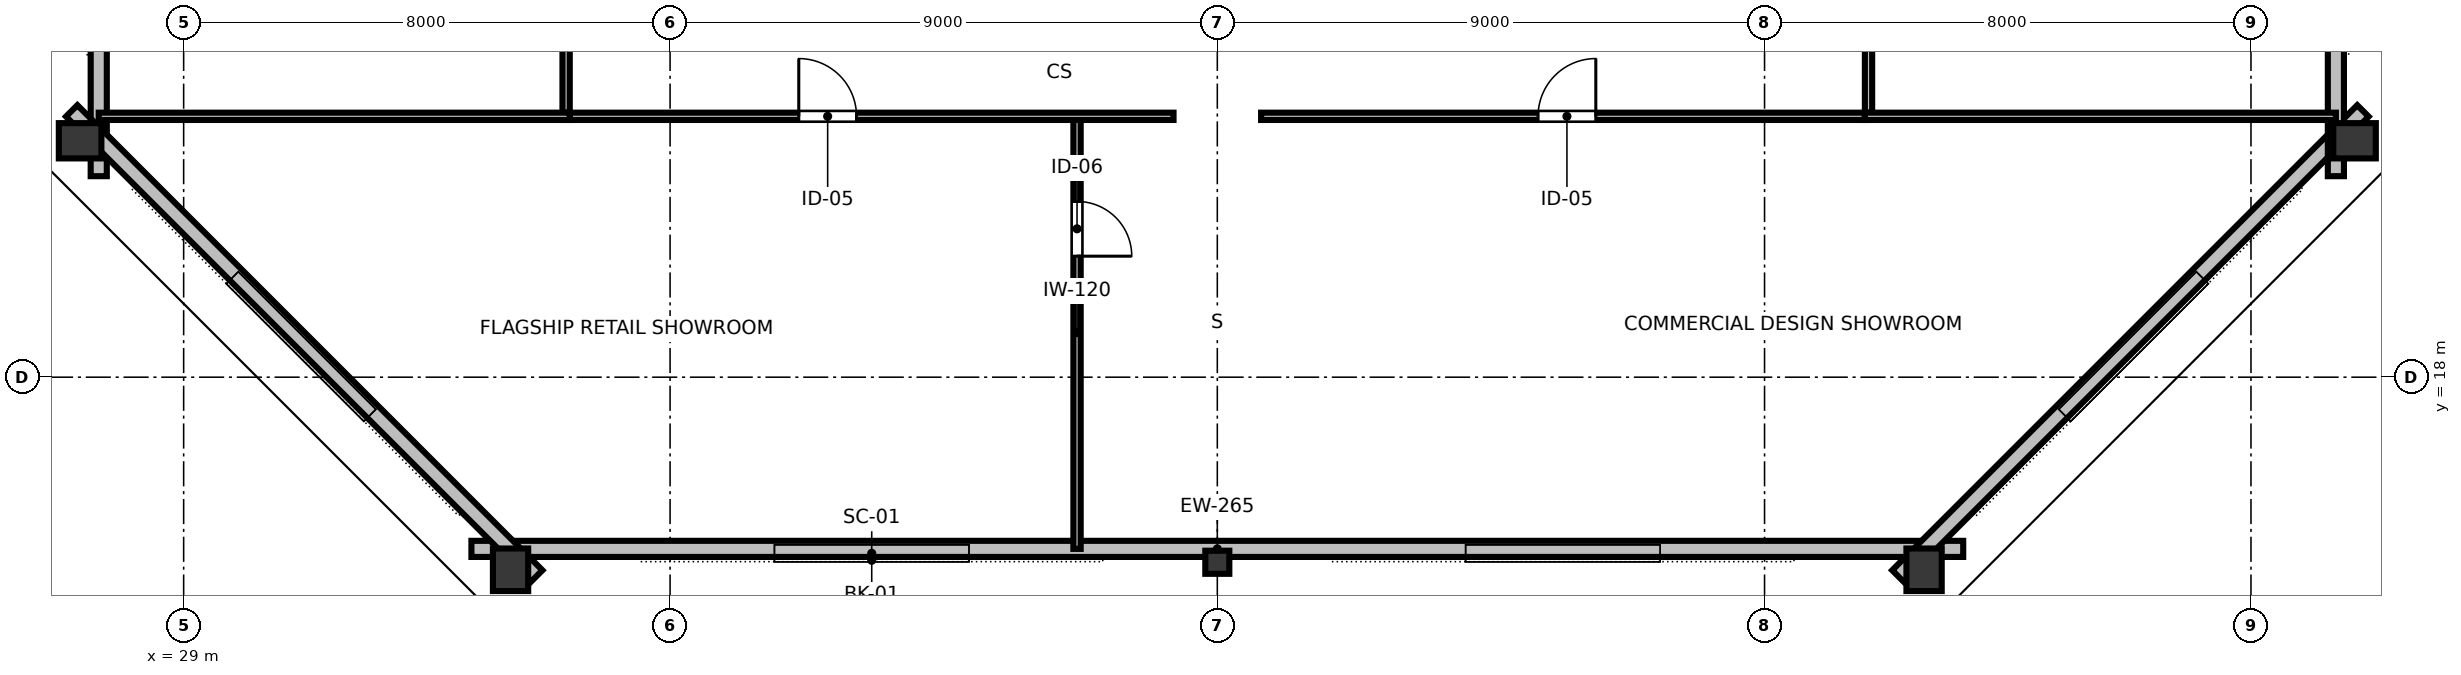
"""IFC4 building model, lengths in metres.
Left out: names, types, materials, properties, quantities, classifications, styles, units other than length and angle.
Written with IfcOpenShell. Run it as: python <this file> out.ifc"""

import sys

from ifc_helpers import new_model, si_unit, direction, frame, frame_2d, origin, origin_2d, place, context, subcontext, project, spatial, rectangle, hollow_rectangle, i_section, extrude, element, fill, save


model = new_model("IFC4")
c1 = context("Model", 3, precision=1e-05, world=origin(), true_north=direction((0.0, 1.0)))
c2 = subcontext(c1, "Body", "Model", "MODEL_VIEW")
j1 = project(units=[si_unit("LENGTHUNIT", "METRE"), si_unit("PLANEANGLEUNIT", "RADIAN")], contexts=[c1])
p1 = place(None, origin())
s1 = spatial("IfcSite", under=j1, at=p1, CompositionType="ELEMENT")
p2 = place(p1, origin())
s2 = spatial("IfcBuilding", under=s1, at=p2, CompositionType="ELEMENT")
p3 = place(p2, frame((0.0, 0.0, 250.2)))
s3 = spatial("IfcBuildingStorey", under=s2, at=p3, CompositionType="ELEMENT", Elevation=250.2)
p4 = place(p3, frame((34.376, 14.833, 0.0), z_axis=(0.0, 0.0, 1.0), x_axis=(1.0, 0.0, 0.0)))
e1 = element("IfcColumn", 1, at=p4, inside=s3, PredefinedType="COLUMN", context=c2, shape_type="SweptSolid", body=[
    extrude(hollow_rectangle(XDim=0.58, YDim=0.7, WallThickness=0.032, at=origin_2d()), origin(), (0.0, 0.0, 1.0), 3.373),
])
p5 = place(p3, frame((46.0, 14.956, 0.0), z_axis=(0.0, 0.0, 1.0), x_axis=(1.0, 0.0, 0.0)))
e2 = element("IfcColumn", 2, at=p5, inside=s3, PredefinedType="COLUMN", context=c2, shape_type="SweptSolid", body=[
    extrude(i_section(OverallWidth=0.395, OverallDepth=0.38, WebThickness=0.019, FlangeThickness=0.03, FilletRadius=0.025, at=origin_2d()), origin(), (0.0, 0.0, 1.0), 3.373),
])
for number, where, z_axis, x_axis in (
    (3, (57.624, 14.833, 0.0), (0.0, 0.0, 1.0), (1.0, 0.0, 0.0)),
    (4, (64.703, 21.888, 0.0), (0.0, 0.0, 1.0), (0.0, 1.0, 0.0)),
    (5, (27.297, 21.888, 0.0), (0.0, 0.0, 1.0), (0.0, 1.0, 0.0)),
):
    element("IfcColumn", number, at=place(p3, frame(where, z_axis=z_axis, x_axis=x_axis)), inside=s3, PredefinedType="COLUMN", context=c2, shape_type="SweptSolid", body=[
        extrude(hollow_rectangle(XDim=0.58, YDim=0.7, WallThickness=0.032, at=origin_2d()), origin(), (0.0, 0.0, 1.0), 3.373),
    ])
p6 = place(p3, frame((33.733, 15.177, 0.0), z_axis=(0.0, 0.0, 1.0), x_axis=(1.0, 0.0, 0.0)))
e6 = element("IfcWall", 6, at=p6, inside=s3, PredefinedType="STANDARD", context=c2, shape_type="SweptSolid", body=[
    extrude(rectangle(XDim=24.535, YDim=0.265, at=frame_2d((12.267, 0.0))), origin(), (0.0, 0.0, 1.0), 2.832),
])
p7 = place(p3, frame((57.193, 14.731, 0.0), z_axis=(0.0, 0.0, 1.0), x_axis=(0.707106781187, 0.707106781187, 0.0)))
e7 = element("IfcWall", 7, at=p7, inside=s3, PredefinedType="STANDARD", context=c2, shape_type="SweptSolid", body=[
    extrude(rectangle(XDim=10.816, YDim=0.265, at=frame_2d((5.408, 0.0))), origin(), (0.0, 0.0, 1.0), 2.832),
])
for number, where, z_axis, x_axis in (
    (8, (64.396, 21.305, 0.0), (0.0, 0.0, 1.0), (0.0, 1.0, 0.0)),
    (9, (27.604, 42.695, 0.0), (0.0, 0.0, 1.0), (0.0, -1.0, 0.0)),
):
    element("IfcWall", number, at=place(p3, frame(where, z_axis=z_axis, x_axis=x_axis)), inside=s3, PredefinedType="STANDARD", context=c2, shape_type="SweptSolid", body=[
        extrude(rectangle(XDim=21.389, YDim=0.265, at=frame_2d((10.695, 0.0))), origin(), (0.0, 0.0, 1.0), 2.832),
    ])
p8 = place(p3, frame((27.159, 22.38, 0.0), z_axis=(0.0, 0.0, 1.0), x_axis=(0.707106781187, -0.707106781187, 0.0)))
e10 = element("IfcWall", 10, at=p8, inside=s3, PredefinedType="STANDARD", context=c2, shape_type="SweptSolid", body=[
    extrude(rectangle(XDim=10.816, YDim=0.265, at=frame_2d((5.408, 0.0))), origin(), (0.0, 0.0, 1.0), 2.832),
])
p9 = place(p3, frame((43.693, 22.29, 0.0), z_axis=(0.0, 0.0, 1.0), x_axis=(0.0, -1.0, 0.0)))
e11 = element("IfcWall", 11, at=p9, inside=s3, PredefinedType="PARTITIONING", context=c2, shape_type="SweptSolid", body=[
    extrude(rectangle(XDim=7.114, YDim=0.12, at=frame_2d((3.557, 0.0))), origin(), (0.0, 0.0, 1.0), 2.655),
])
p10 = place(p9, frame((1.4, 0.0, 0.0)))
e12 = element("IfcOpeningElement", 12, at=p10, cuts=e11, PredefinedType="OPENING", context=c2, shape_type="SweptSolid", body=[
    extrude(rectangle(XDim=0.9, YDim=2.15, at=frame_2d((0.45, 1.075))), frame((0.0, 0.07, 0.0), z_axis=(0.0, -1.0, 0.0), x_axis=(1.0, 0.0, 0.0)), (0.0, 0.0, 1.0), 0.14),
])
p11 = place(p3, frame((35.35, 22.29, 0.0), z_axis=(0.0, 0.0, 1.0), x_axis=(1.0, 0.0, 0.0)))
e13 = element("IfcWall", 13, at=p11, inside=s3, PredefinedType="PARTITIONING", context=c2, shape_type="SweptSolid", body=[
    extrude(rectangle(XDim=9.93, YDim=0.12, at=frame_2d((4.965, 0.0))), origin(), (0.0, 0.0, 1.0), 2.655),
])
p12 = place(p11, frame((3.767, 0.0, 0.0)))
e14 = element("IfcOpeningElement", 14, at=p12, cuts=e13, PredefinedType="OPENING", context=c2, shape_type="SweptSolid", body=[
    extrude(rectangle(XDim=0.95, YDim=2.15, at=frame_2d((0.475, 1.075))), frame((0.0, 0.07, 0.0), z_axis=(0.0, -1.0, 0.0), x_axis=(1.0, 0.0, 0.0)), (0.0, 0.0, 1.0), 0.14),
])
p13 = place(p3, frame((46.72, 22.29, 0.0), z_axis=(0.0, 0.0, 1.0), x_axis=(1.0, 0.0, 0.0)))
e15 = element("IfcWall", 15, at=p13, inside=s3, PredefinedType="PARTITIONING", context=c2, shape_type="SweptSolid", body=[
    extrude(rectangle(XDim=9.93, YDim=0.12, at=frame_2d((4.965, 0.0))), origin(), (0.0, 0.0, 1.0), 2.655),
])
p14 = place(p13, frame((4.555, 0.0, 0.0)))
e16 = element("IfcOpeningElement", 16, at=p14, cuts=e15, PredefinedType="OPENING", context=c2, shape_type="SweptSolid", body=[
    extrude(rectangle(XDim=0.95, YDim=2.15, at=frame_2d((0.475, 1.075))), frame((0.0, 0.07, 0.0), z_axis=(0.0, -1.0, 0.0), x_axis=(1.0, 0.0, 0.0)), (0.0, 0.0, 1.0), 0.14),
])
p15 = place(p3, frame((35.29, 22.35, 0.0), z_axis=(0.0, 0.0, 1.0), x_axis=(0.0, 1.0, 0.0)))
e17 = element("IfcWall", 17, at=p15, inside=s3, PredefinedType="PARTITIONING", context=c2, shape_type="SweptSolid", body=[
    extrude(rectangle(XDim=19.3, YDim=0.12, at=frame_2d((9.65, 0.0))), origin(), (0.0, 0.0, 1.0), 2.655),
])
p16 = place(p15, frame((3.656, 0.0, 0.0)))
e18 = element("IfcOpeningElement", 18, at=p16, cuts=e17, PredefinedType="OPENING", context=c2, shape_type="SweptSolid", body=[
    extrude(rectangle(XDim=0.95, YDim=2.15, at=frame_2d((0.475, 1.075))), frame((0.0, 0.07, 0.0), z_axis=(0.0, -1.0, 0.0), x_axis=(1.0, 0.0, 0.0)), (0.0, 0.0, 1.0), 0.14),
])
p17 = place(p15, frame((13.106, 0.0, 0.0)))
e19 = element("IfcOpeningElement", 19, at=p17, cuts=e17, PredefinedType="OPENING", context=c2, shape_type="SweptSolid", body=[
    extrude(rectangle(XDim=0.95, YDim=2.15, at=frame_2d((0.475, 1.075))), frame((0.0, 0.07, 0.0), z_axis=(0.0, -1.0, 0.0), x_axis=(1.0, 0.0, 0.0)), (0.0, 0.0, 1.0), 0.14),
])
p18 = place(p3, frame((56.71, 22.35, 0.0), z_axis=(0.0, 0.0, 1.0), x_axis=(0.0, 1.0, 0.0)))
e20 = element("IfcWall", 20, at=p18, inside=s3, PredefinedType="PARTITIONING", context=c2, shape_type="SweptSolid", body=[
    extrude(rectangle(XDim=19.3, YDim=0.12, at=frame_2d((9.65, 0.0))), origin(), (0.0, 0.0, 1.0), 2.655),
])
p19 = place(p18, frame((5.657, 0.0, 0.0)))
e21 = element("IfcOpeningElement", 21, at=p19, cuts=e20, PredefinedType="OPENING", context=c2, shape_type="SweptSolid", body=[
    extrude(rectangle(XDim=0.95, YDim=2.15, at=frame_2d((0.475, 1.075))), frame((0.0, 0.07, 0.0), z_axis=(0.0, -1.0, 0.0), x_axis=(1.0, 0.0, 0.0)), (0.0, 0.0, 1.0), 0.14),
])
p20 = place(p18, frame((15.107, 0.0, 0.0)))
e22 = element("IfcOpeningElement", 22, at=p20, cuts=e20, PredefinedType="OPENING", context=c2, shape_type="SweptSolid", body=[
    extrude(rectangle(XDim=0.95, YDim=2.15, at=frame_2d((0.475, 1.075))), frame((0.0, 0.07, 0.0), z_axis=(0.0, -1.0, 0.0), x_axis=(1.0, 0.0, 0.0)), (0.0, 0.0, 1.0), 0.14),
])
for number, where, z_axis, x_axis in (
    (23, (35.35, 22.29, 0.0), (0.0, 0.0, 1.0), (-1.0, 0.0, 0.0)),
    (24, (56.65, 22.29, 0.0), (0.0, 0.0, 1.0), (1.0, 0.0, 0.0)),
):
    element("IfcWall", number, at=place(p3, frame(where, z_axis=z_axis, x_axis=x_axis)), inside=s3, PredefinedType="PARTITIONING", context=c2, shape_type="SweptSolid", body=[
        extrude(rectangle(XDim=7.747, YDim=0.12, at=frame_2d((3.873, 0.0))), origin(), (0.0, 0.0, 1.0), 2.655),
    ])
p21 = place(p10, origin())
e25 = element("IfcDoor", 25, at=p21, inside=s3, OperationType="SINGLE_SWING_RIGHT", PredefinedType="DOOR", context=c2, shape_type="SweptSolid", body=[
    extrude(rectangle(XDim=0.9, YDim=2.15, at=frame_2d((0.45, 1.075))), frame((0.0, 0.025, 0.0), z_axis=(0.0, -1.0, 0.0), x_axis=(1.0, 0.0, 0.0)), (0.0, 0.0, 1.0), 0.05),
])
fill(e12, e25)
p22 = place(p12, origin())
e26 = element("IfcDoor", 26, at=p22, inside=s3, OperationType="SINGLE_SWING_LEFT", PredefinedType="DOOR", context=c2, shape_type="SweptSolid", body=[
    extrude(rectangle(XDim=0.95, YDim=2.15, at=frame_2d((0.475, 1.075))), frame((0.0, 0.025, 0.0), z_axis=(0.0, -1.0, 0.0), x_axis=(1.0, 0.0, 0.0)), (0.0, 0.0, 1.0), 0.05),
])
fill(e14, e26)
p23 = place(p14, origin())
e27 = element("IfcDoor", 27, at=p23, inside=s3, OperationType="SINGLE_SWING_RIGHT", PredefinedType="DOOR", context=c2, shape_type="SweptSolid", body=[
    extrude(rectangle(XDim=0.95, YDim=2.15, at=frame_2d((0.475, 1.075))), frame((0.0, 0.025, 0.0), z_axis=(0.0, -1.0, 0.0), x_axis=(1.0, 0.0, 0.0)), (0.0, 0.0, 1.0), 0.05),
])
fill(e16, e27)
save(model, sys.argv[1])
